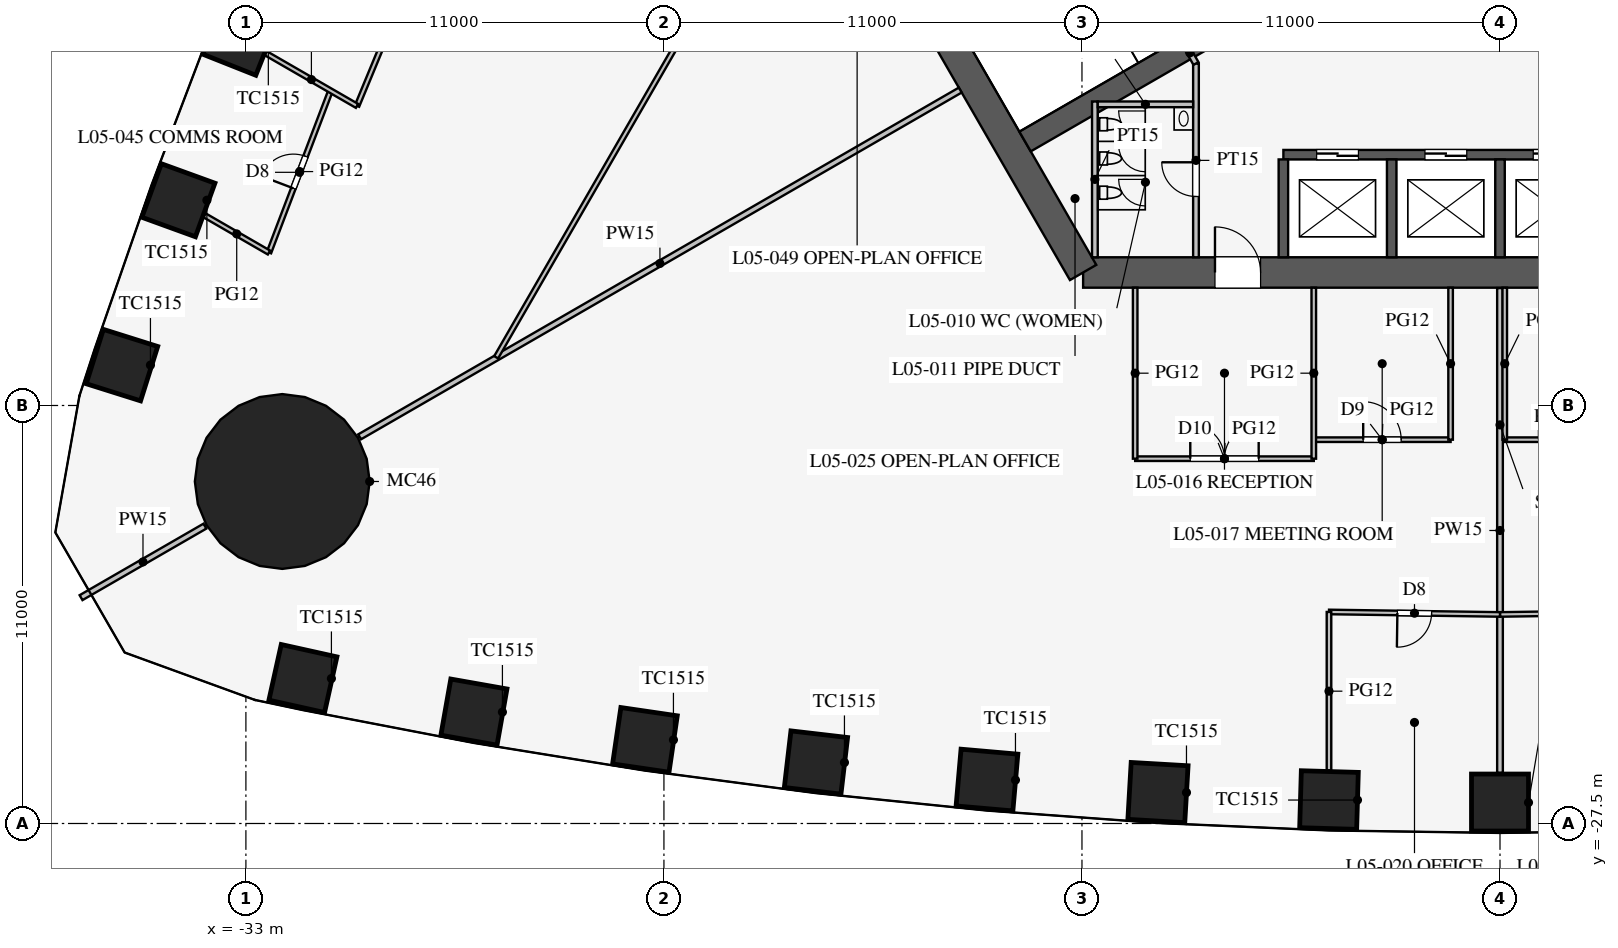
"""IFC4 building model, lengths in metres.
Left out: names, types, materials, properties, quantities, classifications, styles, units other than length and angle.
Written with IfcOpenShell. Run it as: python <this file> out.ifc"""

import sys

from ifc_helpers import new_model, si_unit, direction, frame, frame_2d, origin, origin_2d, place, context, subcontext, project, spatial, rectangle, circle, extrude, element, fill, save


model = new_model("IFC4")
c1 = context("Model", 3, precision=1e-05, world=origin(), true_north=direction((0.0, 1.0)))
c2 = subcontext(c1, "Body", "Model", "MODEL_VIEW")
j1 = project(units=[si_unit("LENGTHUNIT", "METRE"), si_unit("PLANEANGLEUNIT", "RADIAN")], contexts=[c1])
p1 = place(None, origin())
s1 = spatial("IfcSite", under=j1, at=p1, CompositionType="ELEMENT")
p2 = place(p1, origin())
s2 = spatial("IfcBuilding", under=s1, at=p2, CompositionType="ELEMENT")
p3 = place(p2, frame((0.0, 0.0, 24.9)))
s3 = spatial("IfcBuildingStorey", under=s2, at=p3, CompositionType="ELEMENT", Elevation=24.9)
for number, where, z_axis, x_axis in (
    (1, (-31.5, -23.685, 0.0), (0.0, 0.0, 1.0), (0.976, -0.217, 0.0)),
    (2, (-27.0, -24.568, 0.0), (0.0, 0.0, 1.0), (0.985, -0.174, 0.0)),
    (3, (-22.5, -25.299, 0.0), (0.0, 0.0, 1.0), (0.989, -0.145, 0.0)),
    (4, (-18.0, -25.895, 0.0), (0.0, 0.0, 1.0), (0.993, -0.116, 0.0)),
    (5, (-13.5, -26.357, 0.0), (0.0, 0.0, 1.0), (0.996, -0.087, 0.0)),
    (6, (-9.0, -26.686, 0.0), (0.0, 0.0, 1.0), (0.998, -0.058, 0.0)),
    (7, (-4.5, -26.883, 0.0), (0.0, 0.0, 1.0), (1.0, -0.029, 0.0)),
    (8, (0.0, -26.949, 0.0), (0.0, 0.0, 1.0), (1.0, 0.0, 0.0)),
    (9, (-33.16, -6.836, 0.0), (0.0, 0.0, 1.0), (-0.369, -0.929, 0.0)),
    (10, (-34.776, -11.099, 0.0), (0.0, 0.0, 1.0), (-0.342, -0.94, 0.0)),
    (11, (-36.262, -15.438, 0.0), (0.0, 0.0, 1.0), (-0.3, -0.954, 0.0)),
):
    element("IfcColumn", number, at=place(p3, frame(where, z_axis=z_axis, x_axis=x_axis)), inside=s3, PredefinedType="COLUMN", context=c2, shape_type="SweptSolid", body=[
        extrude(rectangle(XDim=1.5, YDim=1.5, at=origin_2d()), origin(), (0.0, 0.0, 1.0), 4.2),
    ])
p4 = place(p3, frame((-32.043, -18.5, 0.0), z_axis=(0.0, 0.0, 1.0), x_axis=(1.0, 0.0, 0.0)))
e12 = element("IfcColumn", 12, at=p4, inside=s3, PredefinedType="COLUMN", context=c2, shape_type="SweptSolid", body=[
    extrude(circle(Radius=2.3, at=origin_2d()), origin(), (0.0, 0.0, 1.0), 4.2),
])
p5 = place(p3, frame((-10.97, -13.0, 0.0), z_axis=(0.0, 0.0, 1.0), x_axis=(1.0, 0.0, 0.0)))
e13 = element("IfcWall", 13, at=p5, inside=s3, PredefinedType="SHEAR", context=c2, shape_type="SweptSolid", body=[
    extrude(rectangle(XDim=21.939, YDim=0.8, at=frame_2d((10.97, 0.0))), origin(), (0.0, 0.0, 1.0), 4.2),
])
p6 = place(p5, frame((17.27, 0.0, 0.0)))
e14 = element("IfcOpeningElement", 14, at=p6, cuts=e13, PredefinedType="OPENING", context=c2, shape_type="SweptSolid", body=[
    extrude(rectangle(XDim=1.2, YDim=2.1, at=frame_2d((0.6, 1.05))), frame((0.0, 0.41, 0.0), z_axis=(0.0, -1.0, 0.0), x_axis=(1.0, 0.0, 0.0)), (0.0, 0.0, 1.0), 0.82),
])
p7 = place(p5, frame((3.47, 0.0, 0.0)))
e15 = element("IfcOpeningElement", 15, at=p7, cuts=e13, PredefinedType="OPENING", context=c2, shape_type="SweptSolid", body=[
    extrude(rectangle(XDim=1.2, YDim=2.1, at=frame_2d((0.6, 1.05))), frame((0.0, 0.41, 0.0), z_axis=(0.0, -1.0, 0.0), x_axis=(1.0, 0.0, 0.0)), (0.0, 0.0, 1.0), 0.82),
])
p8 = place(p3, frame((-16.743, -3.0, 0.0), z_axis=(0.0, 0.0, 1.0), x_axis=(0.499995765644, -0.866027848477, 0.0)))
e16 = element("IfcWall", 16, at=p8, inside=s3, PredefinedType="SHEAR", context=c2, shape_type="SweptSolid", body=[
    extrude(rectangle(XDim=11.547, YDim=0.8, at=frame_2d((5.773, 0.0))), origin(), (0.0, 0.0, 1.0), 4.2),
])
p9 = place(p3, frame((-5.7, -9.9, 0.0), z_axis=(0.0, 0.0, 1.0), x_axis=(1.0, 0.0, 0.0)))
e17 = element("IfcWall", 17, at=p9, inside=s3, PredefinedType="SHEAR", context=c2, shape_type="SweptSolid", body=[
    extrude(rectangle(XDim=11.4, YDim=0.25, at=frame_2d((5.7, 0.0))), origin(), (0.0, 0.0, 1.0), 4.2),
])
p10 = place(p9, frame((0.875, 0.0, 0.0)))
e18 = element("IfcOpeningElement", 18, at=p10, cuts=e17, PredefinedType="OPENING", context=c2, shape_type="SweptSolid", body=[
    extrude(rectangle(XDim=1.1, YDim=2.2, at=frame_2d((0.55, 1.1))), frame((0.0, 0.135, 0.0), z_axis=(0.0, -1.0, 0.0), x_axis=(1.0, 0.0, 0.0)), (0.0, 0.0, 1.0), 0.27),
])
p11 = place(p9, frame((3.725, 0.0, 0.0)))
e19 = element("IfcOpeningElement", 19, at=p11, cuts=e17, PredefinedType="OPENING", context=c2, shape_type="SweptSolid", body=[
    extrude(rectangle(XDim=1.1, YDim=2.2, at=frame_2d((0.55, 1.1))), frame((0.0, 0.135, 0.0), z_axis=(0.0, -1.0, 0.0), x_axis=(1.0, 0.0, 0.0)), (0.0, 0.0, 1.0), 0.27),
])
p12 = place(p9, frame((6.575, 0.0, 0.0)))
e20 = element("IfcOpeningElement", 20, at=p12, cuts=e17, PredefinedType="OPENING", context=c2, shape_type="SweptSolid", body=[
    extrude(rectangle(XDim=1.1, YDim=2.2, at=frame_2d((0.55, 1.1))), frame((0.0, 0.135, 0.0), z_axis=(0.0, -1.0, 0.0), x_axis=(1.0, 0.0, 0.0)), (0.0, 0.0, 1.0), 0.27),
])
p13 = place(p9, frame((9.425, 0.0, 0.0)))
e21 = element("IfcOpeningElement", 21, at=p13, cuts=e17, PredefinedType="OPENING", context=c2, shape_type="SweptSolid", body=[
    extrude(rectangle(XDim=1.1, YDim=2.2, at=frame_2d((0.55, 1.1))), frame((0.0, 0.135, 0.0), z_axis=(0.0, -1.0, 0.0), x_axis=(1.0, 0.0, 0.0)), (0.0, 0.0, 1.0), 0.27),
])
for number, where, z_axis, x_axis in (
    (22, (-5.7, -10.025, 0.0), (0.0, 0.0, 1.0), (0.0, -1.0, 0.0)),
    (23, (-2.85, -10.025, 0.0), (0.0, 0.0, 1.0), (0.0, -1.0, 0.0)),
    (24, (0.0, -10.025, 0.0), (0.0, 0.0, 1.0), (0.0, -1.0, 0.0)),
):
    element("IfcWall", number, at=place(p3, frame(where, z_axis=z_axis, x_axis=x_axis)), inside=s3, PredefinedType="SHEAR", context=c2, shape_type="SweptSolid", body=[
        extrude(rectangle(XDim=2.575, YDim=0.25, at=frame_2d((1.288, 0.0))), origin(), (0.0, 0.0, 1.0), 4.2),
    ])
p14 = place(p3, frame((-4.638, -5.016, 0.0), z_axis=(0.0, 0.0, 1.0), x_axis=(-0.866019375473, -0.500010441196, 0.0)))
e25 = element("IfcWall", 25, at=p14, inside=s3, PredefinedType="SHEAR", context=c2, shape_type="SweptSolid", body=[
    extrude(rectangle(XDim=9.075, YDim=0.6, at=frame_2d((4.538, 0.0))), origin(), (0.0, 0.0, 1.0), 4.2),
])
p15 = place(p3, frame((-8.0, -7.5, 0.0), z_axis=(0.0, 0.0, 1.0), x_axis=(0.0, -1.0, 0.0)))
e26 = element("IfcWall", 26, at=p15, inside=s3, PredefinedType="PARTITIONING", context=c2, shape_type="SweptSolid", body=[
    extrude(rectangle(XDim=5.1, YDim=0.15, at=frame_2d((2.55, 0.0))), origin(), (0.0, 0.0, 1.0), 4.0),
])
p16 = place(p15, frame((2.6, 0.0, 0.0)))
e27 = element("IfcOpeningElement", 27, at=p16, cuts=e26, PredefinedType="OPENING", context=c2, shape_type="SweptSolid", body=[
    extrude(rectangle(XDim=0.9, YDim=2.1, at=frame_2d((0.45, 1.05))), frame((0.0, 0.085, 0.0), z_axis=(0.0, -1.0, 0.0), x_axis=(1.0, 0.0, 0.0)), (0.0, 0.0, 1.0), 0.17),
])
p17 = place(p3, frame((-8.0, -7.5, 0.0), z_axis=(0.0, 0.0, 1.0), x_axis=(-0.499842556608, 0.866116284689, 0.0)))
e28 = element("IfcWall", 28, at=p17, inside=s3, PredefinedType="PARTITIONING", context=c2, shape_type="SweptSolid", body=[
    extrude(rectangle(XDim=0.645, YDim=0.15, at=frame_2d((0.323, 0.0))), origin(), (0.0, 0.0, 1.0), 4.0),
])
p18 = place(p3, frame((-10.66, -8.5, 0.0), z_axis=(0.0, 0.0, 1.0), x_axis=(0.0, -1.0, 0.0)))
e29 = element("IfcWall", 29, at=p18, inside=s3, PredefinedType="PARTITIONING", context=c2, shape_type="SweptSolid", body=[
    extrude(rectangle(XDim=4.1, YDim=0.15, at=frame_2d((2.05, 0.0))), origin(), (0.0, 0.0, 1.0), 4.0),
])
p19 = place(p3, frame((-8.075, -8.575, 0.0), z_axis=(0.0, 0.0, 1.0), x_axis=(-1.0, 0.0, 0.0)))
e30 = element("IfcWall", 30, at=p19, inside=s3, PredefinedType="PARTITIONING", context=c2, shape_type="SweptSolid", body=[
    extrude(rectangle(XDim=2.51, YDim=0.15, at=frame_2d((1.255, 0.0))), origin(), (0.0, 0.0, 1.0), 4.0),
])
p20 = place(p3, frame((-14.203, -8.2, 0.0), z_axis=(0.0, 0.0, 1.0), x_axis=(-0.866024965723, -0.500000758745, 0.0)))
e31 = element("IfcWall", 31, at=p20, inside=s3, PredefinedType="PARTITIONING", context=c2, shape_type="SweptSolid", body=[
    extrude(rectangle(XDim=18.25, YDim=0.15, at=frame_2d((9.125, 0.0))), origin(), (0.0, 0.0, 1.0), 2.3),
])
p21 = place(p3, frame((-34.078, -19.675, 0.0), z_axis=(0.0, 0.0, 1.0), x_axis=(-0.866019247219, -0.500010663332, 0.0)))
e32 = element("IfcWall", 32, at=p21, inside=s3, PredefinedType="PARTITIONING", context=c2, shape_type="SweptSolid", body=[
    extrude(rectangle(XDim=3.764, YDim=0.15, at=frame_2d((1.882, 0.0))), origin(), (0.0, 0.0, 1.0), 2.3),
])
p22 = place(p3, frame((0.0, -13.41, 0.0), z_axis=(0.0, 0.0, 1.0), x_axis=(0.0, -1.0, 0.0)))
e33 = element("IfcWall", 33, at=p22, inside=s3, PredefinedType="PARTITIONING", context=c2, shape_type="SweptSolid", body=[
    extrude(rectangle(XDim=12.759, YDim=0.15, at=frame_2d((6.379, 0.0))), origin(), (0.0, 0.0, 1.0), 3.2),
])
p23 = place(p3, frame((0.125, -17.4, 0.0), z_axis=(0.0, 0.0, 1.0), x_axis=(1.0, 0.0, 0.0)))
e34 = element("IfcWall", 34, at=p23, inside=s3, PredefinedType="PARTITIONING", context=c2, shape_type="SweptSolid", body=[
    extrude(rectangle(XDim=2.7, YDim=0.12, at=frame_2d((1.35, 0.0))), origin(), (0.0, 0.0, 1.0), 2.9),
])
p24 = place(p23, frame((0.9, 0.0, 0.15)))
e35 = element("IfcOpeningElement", 35, at=p24, cuts=e34, PredefinedType="OPENING", context=c2, shape_type="SweptSolid", body=[
    extrude(rectangle(XDim=0.9, YDim=2.1, at=frame_2d((0.45, 1.05))), frame((0.0, 0.07, 0.0), z_axis=(0.0, -1.0, 0.0), x_axis=(1.0, 0.0, 0.0)), (0.0, 0.0, 1.0), 0.14),
])
p25 = place(p3, frame((-4.9, -17.4, 0.0), z_axis=(0.0, 0.0, 1.0), x_axis=(1.0, 0.0, 0.0)))
e36 = element("IfcWall", 36, at=p25, inside=s3, PredefinedType="PARTITIONING", context=c2, shape_type="SweptSolid", body=[
    extrude(rectangle(XDim=3.6, YDim=0.12, at=frame_2d((1.8, 0.0))), origin(), (0.0, 0.0, 1.0), 2.9),
])
p26 = place(p25, frame((1.3, 0.0, 0.15)))
e37 = element("IfcOpeningElement", 37, at=p26, cuts=e36, PredefinedType="OPENING", context=c2, shape_type="SweptSolid", body=[
    extrude(rectangle(XDim=1.0, YDim=2.1, at=frame_2d((0.5, 1.05))), frame((0.0, 0.07, 0.0), z_axis=(0.0, -1.0, 0.0), x_axis=(1.0, 0.0, 0.0)), (0.0, 0.0, 1.0), 0.14),
])
p27 = place(p3, frame((-9.6, -17.9, 0.0), z_axis=(0.0, 0.0, 1.0), x_axis=(1.0, 0.0, 0.0)))
e38 = element("IfcWall", 38, at=p27, inside=s3, PredefinedType="PARTITIONING", context=c2, shape_type="SweptSolid", body=[
    extrude(rectangle(XDim=4.7, YDim=0.12, at=frame_2d((2.35, 0.0))), origin(), (0.0, 0.0, 1.0), 2.9),
])
p28 = place(p27, frame((1.45, 0.0, 0.15)))
e39 = element("IfcOpeningElement", 39, at=p28, cuts=e38, PredefinedType="OPENING", context=c2, shape_type="SweptSolid", body=[
    extrude(rectangle(XDim=1.8, YDim=2.1, at=frame_2d((0.9, 1.05))), frame((0.0, 0.07, 0.0), z_axis=(0.0, -1.0, 0.0), x_axis=(1.0, 0.0, 0.0)), (0.0, 0.0, 1.0), 0.14),
])
for number, where, z_axis, x_axis in (
    (40, (0.125, -13.4, 0.0), (0.0, 0.0, 1.0), (0.0, -1.0, 0.0)),
    (41, (-1.3, -13.4, 0.0), (0.0, 0.0, 1.0), (0.0, -1.0, 0.0)),
):
    element("IfcWall", number, at=place(p3, frame(where, z_axis=z_axis, x_axis=x_axis)), inside=s3, PredefinedType="PARTITIONING", context=c2, shape_type="SweptSolid", body=[
        extrude(rectangle(XDim=4.0, YDim=0.12, at=frame_2d((2.0, 0.0))), origin(), (0.0, 0.0, 1.0), 2.9),
    ])
for number, where, z_axis, x_axis in (
    (42, (-4.9, -13.4, 0.0), (0.0, 0.0, 1.0), (0.0, -1.0, 0.0)),
    (43, (-9.6, -13.4, 0.0), (0.0, 0.0, 1.0), (0.0, -1.0, 0.0)),
):
    element("IfcWall", number, at=place(p3, frame(where, z_axis=z_axis, x_axis=x_axis)), inside=s3, PredefinedType="PARTITIONING", context=c2, shape_type="SweptSolid", body=[
        extrude(rectangle(XDim=4.5, YDim=0.12, at=frame_2d((2.25, 0.0))), origin(), (0.0, 0.0, 1.0), 2.9),
    ])
p29 = place(p3, frame((0.0, -21.999, 0.0), z_axis=(0.0, 0.0, 1.0), x_axis=(0.999894311967, 0.014538393859, 0.0)))
e44 = element("IfcWall", 44, at=p29, inside=s3, PredefinedType="PARTITIONING", context=c2, shape_type="SweptSolid", body=[
    extrude(rectangle(XDim=4.5, YDim=0.12, at=frame_2d((2.25, 0.0))), origin(), (0.0, 0.0, 1.0), 2.9),
])
p30 = place(p29, frame((1.8, 0.0, 0.15)))
e45 = element("IfcOpeningElement", 45, at=p30, cuts=e44, PredefinedType="OPENING", context=c2, shape_type="SweptSolid", body=[
    extrude(rectangle(XDim=0.9, YDim=2.1, at=frame_2d((0.45, 1.05))), frame((0.0, 0.07, 0.0), z_axis=(0.0, -1.0, 0.0), x_axis=(1.0, 0.0, 0.0)), (0.0, 0.0, 1.0), 0.14),
])
p31 = place(p3, frame((-4.5, -21.933, 0.0), z_axis=(0.0, 0.0, 1.0), x_axis=(0.999894311967, -0.014538393859, 0.0)))
e46 = element("IfcWall", 46, at=p31, inside=s3, PredefinedType="PARTITIONING", context=c2, shape_type="SweptSolid", body=[
    extrude(rectangle(XDim=4.5, YDim=0.12, at=frame_2d((2.25, 0.0))), origin(), (0.0, 0.0, 1.0), 2.9),
])
p32 = place(p31, frame((1.8, 0.0, 0.15)))
e47 = element("IfcOpeningElement", 47, at=p32, cuts=e46, PredefinedType="OPENING", context=c2, shape_type="SweptSolid", body=[
    extrude(rectangle(XDim=0.9, YDim=2.1, at=frame_2d((0.45, 1.05))), frame((0.0, 0.07, 0.0), z_axis=(0.0, -1.0, 0.0), x_axis=(1.0, 0.0, 0.0)), (0.0, 0.0, 1.0), 0.14),
])
p33 = place(p3, frame((-4.5, -21.933, 0.0), z_axis=(0.0, 0.0, 1.0), x_axis=(0.0, -1.0, 0.0)))
e48 = element("IfcWall", 48, at=p33, inside=s3, PredefinedType="PARTITIONING", context=c2, shape_type="SweptSolid", body=[
    extrude(rectangle(XDim=4.169, YDim=0.12, at=frame_2d((2.085, 0.0))), origin(), (0.0, 0.0, 1.0), 2.9),
])
p34 = place(p3, frame((-0.016, 30.491, 0.0), z_axis=(0.0, 0.0, 1.0), x_axis=(-0.50000091641, -0.866024874695, 0.0)))
e49 = element("IfcWall", 49, at=p34, inside=s3, PredefinedType="PARTITIONING", context=c2, shape_type="SweptSolid", body=[
    extrude(rectangle(XDim=52.796, YDim=0.12, at=frame_2d((26.398, 0.0))), origin(), (0.0, 0.0, 1.0), 2.9),
])
p35 = place(p34, frame((10.2, 0.0, 0.15)))
e50 = element("IfcOpeningElement", 50, at=p35, cuts=e49, PredefinedType="OPENING", context=c2, shape_type="SweptSolid", body=[
    extrude(rectangle(XDim=1.8, YDim=2.1, at=frame_2d((0.9, 1.05))), frame((0.0, 0.07, 0.0), z_axis=(0.0, -1.0, 0.0), x_axis=(1.0, 0.0, 0.0)), (0.0, 0.0, 1.0), 0.14),
])
p36 = place(p34, frame((40.8, 0.0, 0.15)))
e51 = element("IfcOpeningElement", 51, at=p36, cuts=e49, PredefinedType="OPENING", context=c2, shape_type="SweptSolid", body=[
    extrude(rectangle(XDim=1.8, YDim=2.1, at=frame_2d((0.9, 1.05))), frame((0.0, 0.07, 0.0), z_axis=(0.0, -1.0, 0.0), x_axis=(1.0, 0.0, 0.0)), (0.0, 0.0, 1.0), 0.14),
])
p37 = place(p3, frame((-28.339, -4.423, 0.0), z_axis=(0.0, 0.0, 1.0), x_axis=(-0.382639984525, -0.923897527999, 0.0)))
e52 = element("IfcWall", 52, at=p37, inside=s3, PredefinedType="PARTITIONING", context=c2, shape_type="SweptSolid", body=[
    extrude(rectangle(XDim=4.539, YDim=0.12, at=frame_2d((2.27, 0.0))), origin(), (0.0, 0.0, 1.0), 2.9),
])
p38 = place(p37, frame((1.8, 0.0, 0.15)))
e53 = element("IfcOpeningElement", 53, at=p38, cuts=e52, PredefinedType="OPENING", context=c2, shape_type="SweptSolid", body=[
    extrude(rectangle(XDim=0.9, YDim=2.1, at=frame_2d((0.45, 1.05))), frame((0.0, 0.07, 0.0), z_axis=(0.0, -1.0, 0.0), x_axis=(1.0, 0.0, 0.0)), (0.0, 0.0, 1.0), 0.14),
])
p39 = place(p3, frame((-30.773, -8.214, 0.0), z_axis=(0.0, 0.0, 1.0), x_axis=(-0.355351603025, -0.93473270951, 0.0)))
e54 = element("IfcWall", 54, at=p39, inside=s3, PredefinedType="PARTITIONING", context=c2, shape_type="SweptSolid", body=[
    extrude(rectangle(XDim=4.559, YDim=0.12, at=frame_2d((2.279, 0.0))), origin(), (0.0, 0.0, 1.0), 2.9),
])
p40 = place(p39, frame((1.85, 0.0, 0.15)))
e55 = element("IfcOpeningElement", 55, at=p40, cuts=e54, PredefinedType="OPENING", context=c2, shape_type="SweptSolid", body=[
    extrude(rectangle(XDim=0.9, YDim=2.1, at=frame_2d((0.45, 1.05))), frame((0.0, 0.07, 0.0), z_axis=(0.0, -1.0, 0.0), x_axis=(1.0, 0.0, 0.0)), (0.0, 0.0, 1.0), 0.14),
])
p41 = place(p3, frame((-30.076, -8.617, 0.0), z_axis=(0.0, 0.0, 1.0), x_axis=(-0.866002324719, 0.500039971984, 0.0)))
e56 = element("IfcWall", 56, at=p41, inside=s3, PredefinedType="PARTITIONING", context=c2, shape_type="SweptSolid", body=[
    extrude(rectangle(XDim=2.773, YDim=0.12, at=frame_2d((1.387, 0.0))), origin(), (0.0, 0.0, 1.0), 2.9),
])
p42 = place(p3, frame((-32.393, -12.475, 0.0), z_axis=(0.0, 0.0, 1.0), x_axis=(-0.865996887259, 0.500049388818, 0.0)))
e57 = element("IfcWall", 57, at=p42, inside=s3, PredefinedType="PARTITIONING", context=c2, shape_type="SweptSolid", body=[
    extrude(rectangle(XDim=1.961, YDim=0.12, at=frame_2d((0.98, 0.0))), origin(), (0.0, 0.0, 1.0), 2.9),
])
p43 = place(p16, frame((0.9, 0.0, 0.0), z_axis=(0.0, 0.0, 1.0), x_axis=(-1.0, 0.0, 0.0)))
e58 = element("IfcDoor", 58, at=p43, inside=s3, OperationType="SINGLE_SWING_RIGHT", PredefinedType="DOOR", context=c2, shape_type="SweptSolid", body=[
    extrude(rectangle(XDim=0.9, YDim=2.1, at=frame_2d((0.45, 1.05))), frame((0.0, 0.025, 0.0), z_axis=(0.0, -1.0, 0.0), x_axis=(1.0, 0.0, 0.0)), (0.0, 0.0, 1.0), 0.05),
])
fill(e27, e58)
p44 = place(p7, origin())
e59 = element("IfcDoor", 59, at=p44, inside=s3, OperationType="SINGLE_SWING_LEFT", PredefinedType="DOOR", context=c2, shape_type="SweptSolid", body=[
    extrude(rectangle(XDim=1.2, YDim=2.1, at=frame_2d((0.6, 1.05))), frame((0.0, 0.025, 0.0), z_axis=(0.0, -1.0, 0.0), x_axis=(1.0, 0.0, 0.0)), (0.0, 0.0, 1.0), 0.05),
])
fill(e15, e59)
p45 = place(p28, origin())
e60 = element("IfcDoor", 60, at=p45, inside=s3, OperationType="DOUBLE_DOOR_SINGLE_SWING", PredefinedType="DOOR", context=c2, shape_type="SweptSolid", body=[
    extrude(rectangle(XDim=1.8, YDim=2.1, at=frame_2d((0.9, 1.05))), frame((0.0, 0.025, 0.0), z_axis=(0.0, -1.0, 0.0), x_axis=(1.0, 0.0, 0.0)), (0.0, 0.0, 1.0), 0.05),
])
fill(e39, e60)
p46 = place(p26, origin())
e61 = element("IfcDoor", 61, at=p46, inside=s3, OperationType="SINGLE_SWING_LEFT", PredefinedType="DOOR", context=c2, shape_type="SweptSolid", body=[
    extrude(rectangle(XDim=1.0, YDim=2.1, at=frame_2d((0.5, 1.05))), frame((0.0, 0.025, 0.0), z_axis=(0.0, -1.0, 0.0), x_axis=(1.0, 0.0, 0.0)), (0.0, 0.0, 1.0), 0.05),
])
fill(e37, e61)
p47 = place(p32, frame((0.9, 0.0, 0.0), z_axis=(0.0, 0.0, 1.0), x_axis=(-1.0, 0.0, 0.0)))
e62 = element("IfcDoor", 62, at=p47, inside=s3, OperationType="SINGLE_SWING_RIGHT", PredefinedType="DOOR", context=c2, shape_type="SweptSolid", body=[
    extrude(rectangle(XDim=0.9, YDim=2.1, at=frame_2d((0.45, 1.05))), frame((0.0, 0.025, 0.0), z_axis=(0.0, -1.0, 0.0), x_axis=(1.0, 0.0, 0.0)), (0.0, 0.0, 1.0), 0.05),
])
fill(e47, e62)
p48 = place(p40, frame((0.9, 0.0, 0.0), z_axis=(0.0, 0.0, 1.0), x_axis=(-1.0, 0.0, 0.0)))
e63 = element("IfcDoor", 63, at=p48, inside=s3, OperationType="SINGLE_SWING_LEFT", PredefinedType="DOOR", context=c2, shape_type="SweptSolid", body=[
    extrude(rectangle(XDim=0.9, YDim=2.1, at=frame_2d((0.45, 1.05))), frame((0.0, 0.025, 0.0), z_axis=(0.0, -1.0, 0.0), x_axis=(1.0, 0.0, 0.0)), (0.0, 0.0, 1.0), 0.05),
])
fill(e55, e63)
p49 = place(p10, origin())
e64 = element("IfcDoor", 64, at=p49, inside=s3, OperationType="DOUBLE_DOOR_SLIDING", PredefinedType="DOOR", context=c2, shape_type="SweptSolid", body=[
    extrude(rectangle(XDim=1.1, YDim=2.2, at=frame_2d((0.55, 1.1))), frame((0.0, 0.025, 0.0), z_axis=(0.0, -1.0, 0.0), x_axis=(1.0, 0.0, 0.0)), (0.0, 0.0, 1.0), 0.05),
])
fill(e18, e64)
p50 = place(p11, origin())
e65 = element("IfcDoor", 65, at=p50, inside=s3, OperationType="DOUBLE_DOOR_SLIDING", PredefinedType="DOOR", context=c2, shape_type="SweptSolid", body=[
    extrude(rectangle(XDim=1.1, YDim=2.2, at=frame_2d((0.55, 1.1))), frame((0.0, 0.025, 0.0), z_axis=(0.0, -1.0, 0.0), x_axis=(1.0, 0.0, 0.0)), (0.0, 0.0, 1.0), 0.05),
])
fill(e19, e65)
p51 = place(p12, origin())
e66 = element("IfcDoor", 66, at=p51, inside=s3, OperationType="DOUBLE_DOOR_SLIDING", PredefinedType="DOOR", context=c2, shape_type="SweptSolid", body=[
    extrude(rectangle(XDim=1.1, YDim=2.2, at=frame_2d((0.55, 1.1))), frame((0.0, 0.025, 0.0), z_axis=(0.0, -1.0, 0.0), x_axis=(1.0, 0.0, 0.0)), (0.0, 0.0, 1.0), 0.05),
])
fill(e20, e66)
save(model, sys.argv[1])
